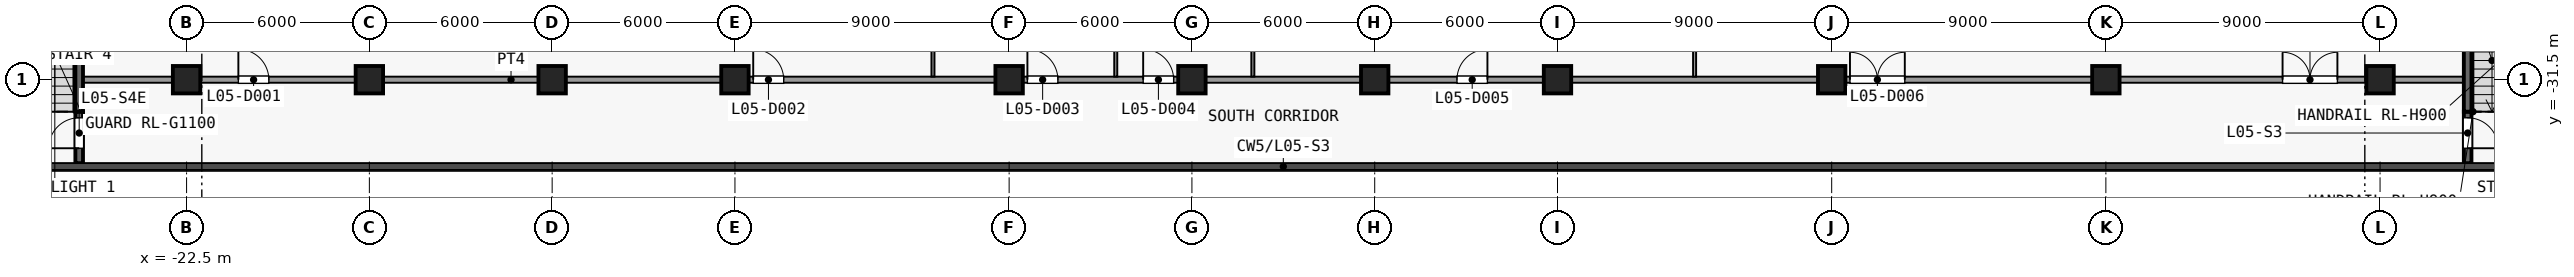
"""IFC4 building model, lengths in metres.
Left out: names, types, materials, properties, quantities, classifications, styles, units other than length and angle.
Written with IfcOpenShell. Run it as: python <this file> out.ifc"""

import sys

from ifc_helpers import new_model, si_unit, direction, frame, frame_2d, origin, origin_2d, place, context, subcontext, project, spatial, rectangle, extrude, element, fill, save


model = new_model("IFC4")
c1 = context("Model", 3, precision=1e-05, world=origin(), true_north=direction((0.0, 1.0)))
c2 = subcontext(c1, "Body", "Model", "MODEL_VIEW")
j1 = project(units=[si_unit("LENGTHUNIT", "METRE"), si_unit("PLANEANGLEUNIT", "RADIAN")], contexts=[c1])
p1 = place(None, origin())
s1 = spatial("IfcSite", under=j1, at=p1, CompositionType="ELEMENT")
p2 = place(p1, origin())
s2 = spatial("IfcBuilding", under=s1, at=p2, CompositionType="ELEMENT")
p3 = place(p2, frame((0.0, 0.0, 28.0)))
s3 = spatial("IfcBuildingStorey", under=s2, at=p3, CompositionType="ELEMENT", Elevation=28.0)
for number, where, z_axis, x_axis in (
    (1, (-22.5, -31.5, 0.0), (0.0, 0.0, 1.0), (1.0, 0.0, 0.0)),
    (2, (-16.5, -31.5, 0.0), (0.0, 0.0, 1.0), (1.0, 0.0, 0.0)),
    (3, (-10.5, -31.5, 0.0), (0.0, 0.0, 1.0), (1.0, 0.0, 0.0)),
    (4, (-4.5, -31.5, 0.0), (0.0, 0.0, 1.0), (1.0, 0.0, 0.0)),
    (5, (4.5, -31.5, 0.0), (0.0, 0.0, 1.0), (1.0, 0.0, 0.0)),
    (6, (10.5, -31.5, 0.0), (0.0, 0.0, 1.0), (1.0, 0.0, 0.0)),
    (7, (16.5, -31.5, 0.0), (0.0, 0.0, 1.0), (1.0, 0.0, 0.0)),
    (8, (22.5, -31.5, 0.0), (0.0, 0.0, 1.0), (1.0, 0.0, 0.0)),
    (9, (31.5, -31.5, 0.0), (0.0, 0.0, 1.0), (1.0, 0.0, 0.0)),
    (10, (40.5, -31.5, 0.0), (0.0, 0.0, 1.0), (1.0, 0.0, 0.0)),
    (11, (49.5, -31.5, 0.0), (0.0, 0.0, 1.0), (1.0, 0.0, 0.0)),
):
    element("IfcColumn", number, at=place(p3, frame(where, z_axis=z_axis, x_axis=x_axis)), inside=s3, PredefinedType="COLUMN", context=c2, shape_type="SweptSolid", body=[
        extrude(rectangle(XDim=0.9, YDim=0.9, at=origin_2d()), origin(), (0.0, 0.0, 1.0), 4.5),
    ])
p4 = place(p3, frame((52.375, -32.55, 0.0), z_axis=(0.0, 0.0, 1.0), x_axis=(0.0, -1.0, 0.0)))
e12 = element("IfcWall", 12, at=p4, inside=s3, PredefinedType="SHEAR", context=c2, shape_type="SweptSolid", body=[
    extrude(rectangle(XDim=1.69, YDim=0.25, at=frame_2d((0.845, 0.0))), origin(), (0.0, 0.0, 1.0), 4.1),
])
p5 = place(p4, frame((0.2, 0.0, 0.0)))
e13 = element("IfcOpeningElement", 13, at=p5, cuts=e12, PredefinedType="OPENING", context=c2, shape_type="SweptSolid", body=[
    extrude(rectangle(XDim=1.0, YDim=2.1, at=frame_2d((0.5, 1.05))), frame((0.0, 0.135, 0.0), z_axis=(0.0, -1.0, 0.0), x_axis=(1.0, 0.0, 0.0)), (0.0, 0.0, 1.0), 0.27),
])
p6 = place(p3, frame((52.375, -32.55, 0.0), z_axis=(0.0, 0.0, 1.0), x_axis=(0.0, 1.0, 0.0)))
e14 = element("IfcWall", 14, at=p6, inside=s3, PredefinedType="SHEAR", context=c2, shape_type="SweptSolid", body=[
    extrude(rectangle(XDim=5.48, YDim=0.25, at=frame_2d((2.74, 0.0))), origin(), (0.0, 0.0, 1.0), 4.1),
])
p7 = place(p3, frame((-26.025, -34.24, 0.0), z_axis=(0.0, 0.0, 1.0), x_axis=(0.0, 1.0, 0.0)))
e15 = element("IfcWall", 15, at=p7, inside=s3, PredefinedType="SHEAR", context=c2, shape_type="SweptSolid", body=[
    extrude(rectangle(XDim=1.69, YDim=0.25, at=frame_2d((0.845, 0.0))), origin(), (0.0, 0.0, 1.0), 4.1),
])
p8 = place(p7, frame((0.49, 0.0, 0.0)))
e16 = element("IfcOpeningElement", 16, at=p8, cuts=e15, PredefinedType="OPENING", context=c2, shape_type="SweptSolid", body=[
    extrude(rectangle(XDim=1.0, YDim=2.1, at=frame_2d((0.5, 1.05))), frame((0.0, 0.135, 0.0), z_axis=(0.0, -1.0, 0.0), x_axis=(1.0, 0.0, 0.0)), (0.0, 0.0, 1.0), 0.27),
])
p9 = place(p3, frame((-26.025, -32.55, 0.0), z_axis=(0.0, 0.0, 1.0), x_axis=(0.0, 1.0, 0.0)))
e17 = element("IfcWall", 17, at=p9, inside=s3, PredefinedType="SHEAR", context=c2, shape_type="SweptSolid", body=[
    extrude(rectangle(XDim=5.48, YDim=0.25, at=frame_2d((2.74, 0.0))), origin(), (0.0, 0.0, 1.0), 4.1),
])
p10 = place(p3, frame((-25.9, -31.5, 0.0), z_axis=(0.0, 0.0, 1.0), x_axis=(1.0, 0.0, 0.0)))
e18 = element("IfcWall", 18, at=p10, inside=s3, PredefinedType="PARTITIONING", context=c2, shape_type="SweptSolid", body=[
    extrude(rectangle(XDim=78.15, YDim=0.2, at=frame_2d((39.075, 0.0))), origin(), (0.0, 0.0, 1.0), 4.1),
])
p11 = place(p10, frame((5.1, 0.0, 0.0)))
e19 = element("IfcOpeningElement", 19, at=p11, cuts=e18, PredefinedType="OPENING", context=c2, shape_type="SweptSolid", body=[
    extrude(rectangle(XDim=1.0, YDim=2.1, at=frame_2d((0.5, 1.05))), frame((0.0, 0.11, 0.0), z_axis=(0.0, -1.0, 0.0), x_axis=(1.0, 0.0, 0.0)), (0.0, 0.0, 1.0), 0.22),
])
p12 = place(p10, frame((22.0, 0.0, 0.0)))
e20 = element("IfcOpeningElement", 20, at=p12, cuts=e18, PredefinedType="OPENING", context=c2, shape_type="SweptSolid", body=[
    extrude(rectangle(XDim=1.0, YDim=2.1, at=frame_2d((0.5, 1.05))), frame((0.0, 0.11, 0.0), z_axis=(0.0, -1.0, 0.0), x_axis=(1.0, 0.0, 0.0)), (0.0, 0.0, 1.0), 0.22),
])
p13 = place(p10, frame((31.0, 0.0, 0.0)))
e21 = element("IfcOpeningElement", 21, at=p13, cuts=e18, PredefinedType="OPENING", context=c2, shape_type="SweptSolid", body=[
    extrude(rectangle(XDim=1.0, YDim=2.1, at=frame_2d((0.5, 1.05))), frame((0.0, 0.11, 0.0), z_axis=(0.0, -1.0, 0.0), x_axis=(1.0, 0.0, 0.0)), (0.0, 0.0, 1.0), 0.22),
])
p14 = place(p10, frame((34.8, 0.0, 0.0)))
e22 = element("IfcOpeningElement", 22, at=p14, cuts=e18, PredefinedType="OPENING", context=c2, shape_type="SweptSolid", body=[
    extrude(rectangle(XDim=1.0, YDim=2.1, at=frame_2d((0.5, 1.05))), frame((0.0, 0.11, 0.0), z_axis=(0.0, -1.0, 0.0), x_axis=(1.0, 0.0, 0.0)), (0.0, 0.0, 1.0), 0.22),
])
p15 = place(p10, frame((45.1, 0.0, 0.0)))
e23 = element("IfcOpeningElement", 23, at=p15, cuts=e18, PredefinedType="OPENING", context=c2, shape_type="SweptSolid", body=[
    extrude(rectangle(XDim=1.0, YDim=2.1, at=frame_2d((0.5, 1.05))), frame((0.0, 0.11, 0.0), z_axis=(0.0, -1.0, 0.0), x_axis=(1.0, 0.0, 0.0)), (0.0, 0.0, 1.0), 0.22),
])
p16 = place(p10, frame((58.0, 0.0, 0.0)))
e24 = element("IfcOpeningElement", 24, at=p16, cuts=e18, PredefinedType="OPENING", context=c2, shape_type="SweptSolid", body=[
    extrude(rectangle(XDim=1.8, YDim=2.1, at=frame_2d((0.9, 1.05))), frame((0.0, 0.11, 0.0), z_axis=(0.0, -1.0, 0.0), x_axis=(1.0, 0.0, 0.0)), (0.0, 0.0, 1.0), 0.22),
])
p17 = place(p10, frame((72.2, 0.0, 0.0)))
e25 = element("IfcOpeningElement", 25, at=p17, cuts=e18, PredefinedType="OPENING", context=c2, shape_type="SweptSolid", body=[
    extrude(rectangle(XDim=1.8, YDim=2.1, at=frame_2d((0.9, 1.05))), frame((0.0, 0.11, 0.0), z_axis=(0.0, -1.0, 0.0), x_axis=(1.0, 0.0, 0.0)), (0.0, 0.0, 1.0), 0.22),
])
for number, where, z_axis, x_axis in (
    (26, (2.0, -31.4, 0.0), (0.0, 0.0, 1.0), (0.0, 1.0, 0.0)),
    (27, (8.0, -31.4, 0.0), (0.0, 0.0, 1.0), (0.0, 1.0, 0.0)),
    (28, (12.5, -31.4, 0.0), (0.0, 0.0, 1.0), (0.0, 1.0, 0.0)),
):
    element("IfcWall", number, at=place(p3, frame(where, z_axis=z_axis, x_axis=x_axis)), inside=s3, PredefinedType="PARTITIONING", context=c2, shape_type="SweptSolid", body=[
        extrude(rectangle(XDim=5.9, YDim=0.1, at=frame_2d((2.95, 0.0))), origin(), (0.0, 0.0, 1.0), 4.1),
    ])
p18 = place(p3, frame((27.0, -31.4, 0.0), z_axis=(0.0, 0.0, 1.0), x_axis=(0.0, 1.0, 0.0)))
e29 = element("IfcWall", 29, at=p18, inside=s3, PredefinedType="PARTITIONING", context=c2, shape_type="SweptSolid", body=[
    extrude(rectangle(XDim=8.8, YDim=0.1, at=frame_2d((4.4, 0.0))), origin(), (0.0, 0.0, 1.0), 4.1),
])
p19 = place(p5, origin())
e30 = element("IfcDoor", 30, at=p19, inside=s3, OperationType="SINGLE_SWING_RIGHT", PredefinedType="DOOR", context=c2, shape_type="SweptSolid", body=[
    extrude(rectangle(XDim=1.0, YDim=2.1, at=frame_2d((0.5, 1.05))), frame((0.0, 0.025, 0.0), z_axis=(0.0, -1.0, 0.0), x_axis=(1.0, 0.0, 0.0)), (0.0, 0.0, 1.0), 0.05),
])
fill(e13, e30)
p20 = place(p8, origin())
e31 = element("IfcDoor", 31, at=p20, inside=s3, OperationType="SINGLE_SWING_LEFT", PredefinedType="DOOR", context=c2, shape_type="SweptSolid", body=[
    extrude(rectangle(XDim=1.0, YDim=2.1, at=frame_2d((0.5, 1.05))), frame((0.0, 0.025, 0.0), z_axis=(0.0, -1.0, 0.0), x_axis=(1.0, 0.0, 0.0)), (0.0, 0.0, 1.0), 0.05),
])
fill(e16, e31)
p21 = place(p11, origin())
e32 = element("IfcDoor", 32, at=p21, inside=s3, OperationType="SINGLE_SWING_RIGHT", PredefinedType="DOOR", context=c2, shape_type="SweptSolid", body=[
    extrude(rectangle(XDim=1.0, YDim=2.1, at=frame_2d((0.5, 1.05))), frame((0.0, 0.025, 0.0), z_axis=(0.0, -1.0, 0.0), x_axis=(1.0, 0.0, 0.0)), (0.0, 0.0, 1.0), 0.05),
])
fill(e19, e32)
p22 = place(p12, origin())
e33 = element("IfcDoor", 33, at=p22, inside=s3, OperationType="SINGLE_SWING_RIGHT", PredefinedType="DOOR", context=c2, shape_type="SweptSolid", body=[
    extrude(rectangle(XDim=1.0, YDim=2.1, at=frame_2d((0.5, 1.05))), frame((0.0, 0.025, 0.0), z_axis=(0.0, -1.0, 0.0), x_axis=(1.0, 0.0, 0.0)), (0.0, 0.0, 1.0), 0.05),
])
fill(e20, e33)
p23 = place(p13, origin())
e34 = element("IfcDoor", 34, at=p23, inside=s3, OperationType="SINGLE_SWING_RIGHT", PredefinedType="DOOR", context=c2, shape_type="SweptSolid", body=[
    extrude(rectangle(XDim=1.0, YDim=2.1, at=frame_2d((0.5, 1.05))), frame((0.0, 0.025, 0.0), z_axis=(0.0, -1.0, 0.0), x_axis=(1.0, 0.0, 0.0)), (0.0, 0.0, 1.0), 0.05),
])
fill(e21, e34)
p24 = place(p14, origin())
e35 = element("IfcDoor", 35, at=p24, inside=s3, OperationType="SINGLE_SWING_RIGHT", PredefinedType="DOOR", context=c2, shape_type="SweptSolid", body=[
    extrude(rectangle(XDim=1.0, YDim=2.1, at=frame_2d((0.5, 1.05))), frame((0.0, 0.025, 0.0), z_axis=(0.0, -1.0, 0.0), x_axis=(1.0, 0.0, 0.0)), (0.0, 0.0, 1.0), 0.05),
])
fill(e22, e35)
p25 = place(p15, origin())
e36 = element("IfcDoor", 36, at=p25, inside=s3, OperationType="SINGLE_SWING_LEFT", PredefinedType="DOOR", context=c2, shape_type="SweptSolid", body=[
    extrude(rectangle(XDim=1.0, YDim=2.1, at=frame_2d((0.5, 1.05))), frame((0.0, 0.025, 0.0), z_axis=(0.0, -1.0, 0.0), x_axis=(1.0, 0.0, 0.0)), (0.0, 0.0, 1.0), 0.05),
])
fill(e23, e36)
p26 = place(p16, origin())
e37 = element("IfcDoor", 37, at=p26, inside=s3, OperationType="DOUBLE_DOOR_SINGLE_SWING", PredefinedType="DOOR", context=c2, shape_type="SweptSolid", body=[
    extrude(rectangle(XDim=1.8, YDim=2.1, at=frame_2d((0.9, 1.05))), frame((0.0, 0.025, 0.0), z_axis=(0.0, -1.0, 0.0), x_axis=(1.0, 0.0, 0.0)), (0.0, 0.0, 1.0), 0.05),
])
fill(e24, e37)
p27 = place(p17, origin())
e38 = element("IfcDoor", 38, at=p27, inside=s3, OperationType="DOUBLE_DOOR_SINGLE_SWING", PredefinedType="DOOR", context=c2, shape_type="SweptSolid", body=[
    extrude(rectangle(XDim=1.8, YDim=2.1, at=frame_2d((0.9, 1.05))), frame((0.0, 0.025, 0.0), z_axis=(0.0, -1.0, 0.0), x_axis=(1.0, 0.0, 0.0)), (0.0, 0.0, 1.0), 0.05),
])
fill(e25, e38)
save(model, sys.argv[1])
